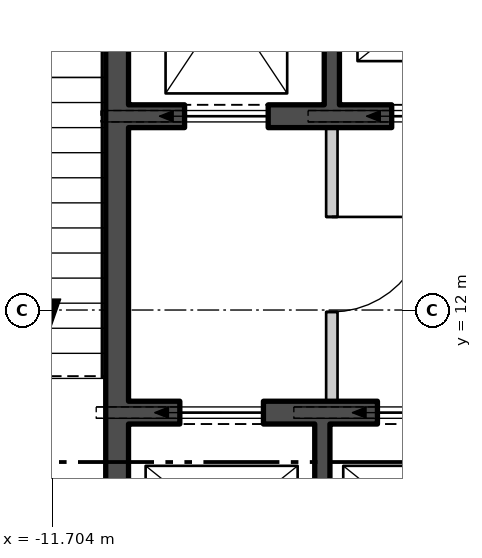
"""IFC4 building model, lengths in metres.
Left out: names, types, materials, properties, quantities, classifications, styles, units other than length and angle.
Written with IfcOpenShell. Run it as: python <this file> out.ifc"""

import sys

from ifc_helpers import new_model, si_unit, direction, frame, frame_2d, origin, place, context, subcontext, project, spatial, polyline, rectangle, outline, extrude, element, fill, save


model = new_model("IFC4")
c1 = context("Model", 3, precision=1e-05, world=origin(), true_north=direction((0.0, 1.0)))
c2 = subcontext(c1, "Body", "Model", "MODEL_VIEW")
j1 = project(units=[si_unit("LENGTHUNIT", "METRE"), si_unit("PLANEANGLEUNIT", "RADIAN")], contexts=[c1])
p1 = place(None, origin())
s1 = spatial("IfcSite", under=j1, at=p1, CompositionType="ELEMENT")
p2 = place(p1, origin())
s2 = spatial("IfcBuilding", under=s1, at=p2, CompositionType="ELEMENT")
p3 = place(p2, frame((0.0, 0.0, 139.8)))
s3 = spatial("IfcBuildingStorey", under=s2, at=p3, CompositionType="ELEMENT", Elevation=139.8)
p4 = place(p3, frame((-27.235, 12.423, -0.18), z_axis=(0.0, 0.0, 1.0), x_axis=(0.500000335318, -0.866025210188, 0.0)))
e1 = element("IfcWall", 1, at=p4, inside=s3, PredefinedType="SOLIDWALL", context=c2, shape_type="SweptSolid", body=[
    extrude(outline(polyline([(-0.13, -0.225), (45.88, -0.225), (45.62, 0.225), (0.13, 0.225), (-0.13, -0.225)])), origin(), (0.0, 0.0, 1.0), 3.68),
])
p5 = place(p4, frame((1.425, 0.0, 1.08)))
e2 = element("IfcOpeningElement", 2, at=p5, cuts=e1, PredefinedType="OPENING", context=c2, shape_type="SweptSolid", body=[
    extrude(rectangle(XDim=2.4, YDim=2.0, at=frame_2d((1.2, 1.0))), frame((0.0, 0.235, 0.0), z_axis=(0.0, -1.0, 0.0), x_axis=(1.0, 0.0, 0.0)), (0.0, 0.0, 1.0), 0.47),
])
p6 = place(p4, frame((5.895, 0.0, 1.08)))
e3 = element("IfcOpeningElement", 3, at=p6, cuts=e1, PredefinedType="OPENING", context=c2, shape_type="SweptSolid", body=[
    extrude(rectangle(XDim=2.4, YDim=2.0, at=frame_2d((1.2, 1.0))), frame((0.0, 0.235, 0.0), z_axis=(0.0, -1.0, 0.0), x_axis=(1.0, 0.0, 0.0)), (0.0, 0.0, 1.0), 0.47),
])
p7 = place(p4, frame((10.403, 0.0, 1.08)))
e4 = element("IfcOpeningElement", 4, at=p7, cuts=e1, PredefinedType="OPENING", context=c2, shape_type="SweptSolid", body=[
    extrude(rectangle(XDim=2.4, YDim=2.0, at=frame_2d((1.2, 1.0))), frame((0.0, 0.235, 0.0), z_axis=(0.0, -1.0, 0.0), x_axis=(1.0, 0.0, 0.0)), (0.0, 0.0, 1.0), 0.47),
])
p8 = place(p4, frame((14.912, 0.0, 1.08)))
e5 = element("IfcOpeningElement", 5, at=p8, cuts=e1, PredefinedType="OPENING", context=c2, shape_type="SweptSolid", body=[
    extrude(rectangle(XDim=2.4, YDim=2.0, at=frame_2d((1.2, 1.0))), frame((0.0, 0.235, 0.0), z_axis=(0.0, -1.0, 0.0), x_axis=(1.0, 0.0, 0.0)), (0.0, 0.0, 1.0), 0.47),
])
p9 = place(p4, frame((19.421, 0.0, 1.08)))
e6 = element("IfcOpeningElement", 6, at=p9, cuts=e1, PredefinedType="OPENING", context=c2, shape_type="SweptSolid", body=[
    extrude(rectangle(XDim=2.4, YDim=2.0, at=frame_2d((1.2, 1.0))), frame((0.0, 0.235, 0.0), z_axis=(0.0, -1.0, 0.0), x_axis=(1.0, 0.0, 0.0)), (0.0, 0.0, 1.0), 0.47),
])
p10 = place(p4, frame((23.929, 0.0, 1.08)))
e7 = element("IfcOpeningElement", 7, at=p10, cuts=e1, PredefinedType="OPENING", context=c2, shape_type="SweptSolid", body=[
    extrude(rectangle(XDim=2.4, YDim=2.0, at=frame_2d((1.2, 1.0))), frame((0.0, 0.235, 0.0), z_axis=(0.0, -1.0, 0.0), x_axis=(1.0, 0.0, 0.0)), (0.0, 0.0, 1.0), 0.47),
])
p11 = place(p4, frame((28.438, 0.0, 1.08)))
e8 = element("IfcOpeningElement", 8, at=p11, cuts=e1, PredefinedType="OPENING", context=c2, shape_type="SweptSolid", body=[
    extrude(rectangle(XDim=2.4, YDim=2.0, at=frame_2d((1.2, 1.0))), frame((0.0, 0.235, 0.0), z_axis=(0.0, -1.0, 0.0), x_axis=(1.0, 0.0, 0.0)), (0.0, 0.0, 1.0), 0.47),
])
p12 = place(p4, frame((32.947, 0.0, 1.08)))
e9 = element("IfcOpeningElement", 9, at=p12, cuts=e1, PredefinedType="OPENING", context=c2, shape_type="SweptSolid", body=[
    extrude(rectangle(XDim=2.4, YDim=2.0, at=frame_2d((1.2, 1.0))), frame((0.0, 0.235, 0.0), z_axis=(0.0, -1.0, 0.0), x_axis=(1.0, 0.0, 0.0)), (0.0, 0.0, 1.0), 0.47),
])
p13 = place(p4, frame((37.455, 0.0, 1.08)))
e10 = element("IfcOpeningElement", 10, at=p13, cuts=e1, PredefinedType="OPENING", context=c2, shape_type="SweptSolid", body=[
    extrude(rectangle(XDim=2.4, YDim=2.0, at=frame_2d((1.2, 1.0))), frame((0.0, 0.235, 0.0), z_axis=(0.0, -1.0, 0.0), x_axis=(1.0, 0.0, 0.0)), (0.0, 0.0, 1.0), 0.47),
])
p14 = place(p4, frame((41.925, 0.0, 1.08)))
e11 = element("IfcOpeningElement", 11, at=p14, cuts=e1, PredefinedType="OPENING", context=c2, shape_type="SweptSolid", body=[
    extrude(rectangle(XDim=2.4, YDim=2.0, at=frame_2d((1.2, 1.0))), frame((0.0, 0.235, 0.0), z_axis=(0.0, -1.0, 0.0), x_axis=(1.0, 0.0, 0.0)), (0.0, 0.0, 1.0), 0.47),
])
p15 = place(p3, frame((-10.85, 2.5, 0.0), z_axis=(0.0, 0.0, 1.0), x_axis=(0.0, 1.0, 0.0)))
e12 = element("IfcWall", 12, at=p15, inside=s3, PredefinedType="SHEAR", context=c2, shape_type="SweptSolid", body=[
    extrude(rectangle(XDim=15.0, YDim=0.3, at=frame_2d((7.5, 0.0))), origin(), (0.0, 0.0, 1.0), 3.7),
])
p16 = place(p15, frame((3.475, 0.0, 0.0)))
e13 = element("IfcOpeningElement", 13, at=p16, cuts=e12, PredefinedType="OPENING", context=c2, shape_type="SweptSolid", body=[
    extrude(rectangle(XDim=1.25, YDim=2.1, at=frame_2d((0.625, 1.05))), frame((0.0, 0.16, 0.0), z_axis=(0.0, -1.0, 0.0), x_axis=(1.0, 0.0, 0.0)), (0.0, 0.0, 1.0), 0.32),
])
p17 = place(p15, frame((1.125, 0.0, 0.0)))
e14 = element("IfcOpeningElement", 14, at=p17, cuts=e12, PredefinedType="OPENING", context=c2, shape_type="SweptSolid", body=[
    extrude(rectangle(XDim=1.0, YDim=2.1, at=frame_2d((0.5, 1.05))), frame((0.0, 0.16, 0.0), z_axis=(0.0, -1.0, 0.0), x_axis=(1.0, 0.0, 0.0)), (0.0, 0.0, 1.0), 0.32),
])
p18 = place(p3, frame((-10.7, 14.55, 0.0), z_axis=(0.0, 0.0, 1.0), x_axis=(1.0, 0.0, 0.0)))
e15 = element("IfcWall", 15, at=p18, inside=s3, PredefinedType="SHEAR", context=c2, shape_type="SweptSolid", body=[
    extrude(rectangle(XDim=21.4, YDim=0.3, at=frame_2d((10.7, 0.0))), origin(), (0.0, 0.0, 1.0), 3.7),
])
p19 = place(p18, frame((0.738, 0.0, 0.0)))
e16 = element("IfcOpeningElement", 16, at=p19, cuts=e15, PredefinedType="OPENING", context=c2, shape_type="SweptSolid", body=[
    extrude(rectangle(XDim=1.1, YDim=2.1, at=frame_2d((0.55, 1.05))), frame((0.0, 0.16, 0.0), z_axis=(0.0, -1.0, 0.0), x_axis=(1.0, 0.0, 0.0)), (0.0, 0.0, 1.0), 0.32),
])
p20 = place(p18, frame((3.462, 0.0, 0.0)))
e17 = element("IfcOpeningElement", 17, at=p20, cuts=e15, PredefinedType="OPENING", context=c2, shape_type="SweptSolid", body=[
    extrude(rectangle(XDim=1.1, YDim=2.1, at=frame_2d((0.55, 1.05))), frame((0.0, 0.16, 0.0), z_axis=(0.0, -1.0, 0.0), x_axis=(1.0, 0.0, 0.0)), (0.0, 0.0, 1.0), 0.32),
])
p21 = place(p18, frame((6.138, 0.0, 0.0)))
e18 = element("IfcOpeningElement", 18, at=p21, cuts=e15, PredefinedType="OPENING", context=c2, shape_type="SweptSolid", body=[
    extrude(rectangle(XDim=1.1, YDim=2.1, at=frame_2d((0.55, 1.05))), frame((0.0, 0.16, 0.0), z_axis=(0.0, -1.0, 0.0), x_axis=(1.0, 0.0, 0.0)), (0.0, 0.0, 1.0), 0.32),
])
p22 = place(p18, frame((8.812, 0.0, 0.0)))
e19 = element("IfcOpeningElement", 19, at=p22, cuts=e15, PredefinedType="OPENING", context=c2, shape_type="SweptSolid", body=[
    extrude(rectangle(XDim=1.1, YDim=2.1, at=frame_2d((0.55, 1.05))), frame((0.0, 0.16, 0.0), z_axis=(0.0, -1.0, 0.0), x_axis=(1.0, 0.0, 0.0)), (0.0, 0.0, 1.0), 0.32),
])
p23 = place(p18, frame((19.562, 0.0, 0.0)))
e20 = element("IfcOpeningElement", 20, at=p23, cuts=e15, PredefinedType="OPENING", context=c2, shape_type="SweptSolid", body=[
    extrude(rectangle(XDim=1.1, YDim=2.1, at=frame_2d((0.55, 1.05))), frame((0.0, 0.16, 0.0), z_axis=(0.0, -1.0, 0.0), x_axis=(1.0, 0.0, 0.0)), (0.0, 0.0, 1.0), 0.32),
])
p24 = place(p18, frame((11.537, 0.0, 0.0)))
e21 = element("IfcOpeningElement", 21, at=p24, cuts=e15, PredefinedType="OPENING", context=c2, shape_type="SweptSolid", body=[
    extrude(rectangle(XDim=1.0, YDim=2.1, at=frame_2d((0.5, 1.05))), frame((0.0, 0.16, 0.0), z_axis=(0.0, -1.0, 0.0), x_axis=(1.0, 0.0, 0.0)), (0.0, 0.0, 1.0), 0.32),
])
p25 = place(p18, frame((14.213, 0.0, 0.0)))
e22 = element("IfcOpeningElement", 22, at=p25, cuts=e15, PredefinedType="OPENING", context=c2, shape_type="SweptSolid", body=[
    extrude(rectangle(XDim=1.0, YDim=2.1, at=frame_2d((0.5, 1.05))), frame((0.0, 0.16, 0.0), z_axis=(0.0, -1.0, 0.0), x_axis=(1.0, 0.0, 0.0)), (0.0, 0.0, 1.0), 0.32),
])
p26 = place(p18, frame((16.887, 0.0, 0.0)))
e23 = element("IfcOpeningElement", 23, at=p26, cuts=e15, PredefinedType="OPENING", context=c2, shape_type="SweptSolid", body=[
    extrude(rectangle(XDim=1.0, YDim=2.1, at=frame_2d((0.5, 1.05))), frame((0.0, 0.16, 0.0), z_axis=(0.0, -1.0, 0.0), x_axis=(1.0, 0.0, 0.0)), (0.0, 0.0, 1.0), 0.32),
])
p27 = place(p3, frame((-10.7, 10.65, 0.0), z_axis=(0.0, 0.0, 1.0), x_axis=(1.0, 0.0, 0.0)))
e24 = element("IfcWall", 24, at=p27, inside=s3, PredefinedType="SHEAR", context=c2, shape_type="SweptSolid", body=[
    extrude(rectangle(XDim=10.3, YDim=0.3, at=frame_2d((5.15, 0.0))), origin(), (0.0, 0.0, 1.0), 3.7),
])
p28 = place(p27, frame((0.675, 0.0, 0.0)))
e25 = element("IfcOpeningElement", 25, at=p28, cuts=e24, PredefinedType="OPENING", context=c2, shape_type="SweptSolid", body=[
    extrude(rectangle(XDim=1.1, YDim=2.1, at=frame_2d((0.55, 1.05))), frame((0.0, 0.16, 0.0), z_axis=(0.0, -1.0, 0.0), x_axis=(1.0, 0.0, 0.0)), (0.0, 0.0, 1.0), 0.32),
])
p29 = place(p27, frame((3.275, 0.0, 0.0)))
e26 = element("IfcOpeningElement", 26, at=p29, cuts=e24, PredefinedType="OPENING", context=c2, shape_type="SweptSolid", body=[
    extrude(rectangle(XDim=1.1, YDim=2.1, at=frame_2d((0.55, 1.05))), frame((0.0, 0.16, 0.0), z_axis=(0.0, -1.0, 0.0), x_axis=(1.0, 0.0, 0.0)), (0.0, 0.0, 1.0), 0.32),
])
p30 = place(p27, frame((5.825, 0.0, 0.0)))
e27 = element("IfcOpeningElement", 27, at=p30, cuts=e24, PredefinedType="OPENING", context=c2, shape_type="SweptSolid", body=[
    extrude(rectangle(XDim=1.1, YDim=2.1, at=frame_2d((0.55, 1.05))), frame((0.0, 0.16, 0.0), z_axis=(0.0, -1.0, 0.0), x_axis=(1.0, 0.0, 0.0)), (0.0, 0.0, 1.0), 0.32),
])
p31 = place(p27, frame((8.425, 0.0, 0.0)))
e28 = element("IfcOpeningElement", 28, at=p31, cuts=e24, PredefinedType="OPENING", context=c2, shape_type="SweptSolid", body=[
    extrude(rectangle(XDim=1.0, YDim=2.1, at=frame_2d((0.5, 1.05))), frame((0.0, 0.16, 0.0), z_axis=(0.0, -1.0, 0.0), x_axis=(1.0, 0.0, 0.0)), (0.0, 0.0, 1.0), 0.32),
])
p32 = place(p3, frame((-8.025, 14.7, 0.0), z_axis=(0.0, 0.0, 1.0), x_axis=(0.0, 1.0, 0.0)))
e29 = element("IfcWall", 29, at=p32, inside=s3, PredefinedType="SHEAR", context=c2, shape_type="SweptSolid", body=[
    extrude(rectangle(XDim=2.8, YDim=0.2, at=frame_2d((1.4, 0.0))), origin(), (0.0, 0.0, 1.0), 3.7),
])
p33 = place(p3, frame((-8.15, 7.8, 0.0), z_axis=(0.0, 0.0, 1.0), x_axis=(0.0, 1.0, 0.0)))
e30 = element("IfcWall", 30, at=p33, inside=s3, PredefinedType="SHEAR", context=c2, shape_type="SweptSolid", body=[
    extrude(rectangle(XDim=2.7, YDim=0.2, at=frame_2d((1.35, 0.0))), origin(), (0.0, 0.0, 1.0), 3.7),
])
p34 = place(p3, frame((-8.025, 10.8, 0.0), z_axis=(0.0, 0.0, 1.0), x_axis=(0.0, 1.0, 0.0)))
e31 = element("IfcWall", 31, at=p34, inside=s3, PredefinedType="PARTITIONING", context=c2, shape_type="SweptSolid", body=[
    extrude(rectangle(XDim=3.6, YDim=0.15, at=frame_2d((1.8, 0.0))), origin(), (0.0, 0.0, 1.0), 3.7),
])
p35 = place(p34, frame((1.175, 0.0, 0.0)))
e32 = element("IfcOpeningElement", 32, at=p35, cuts=e31, PredefinedType="OPENING", context=c2, shape_type="SweptSolid", body=[
    extrude(rectangle(XDim=1.25, YDim=2.1, at=frame_2d((0.625, 1.05))), frame((0.0, 0.085, 0.0), z_axis=(0.0, -1.0, 0.0), x_axis=(1.0, 0.0, 0.0)), (0.0, 0.0, 1.0), 0.17),
])
p36 = place(p19, origin())
e33 = element("IfcDoor", 33, at=p36, inside=s3, OperationType="SLIDING_TO_LEFT", PredefinedType="DOOR", context=c2, shape_type="SweptSolid", body=[
    extrude(rectangle(XDim=1.1, YDim=2.1, at=frame_2d((0.55, 1.05))), frame((0.0, 0.025, 0.0), z_axis=(0.0, -1.0, 0.0), x_axis=(1.0, 0.0, 0.0)), (0.0, 0.0, 1.0), 0.05),
])
fill(e16, e33)
p37 = place(p20, origin())
e34 = element("IfcDoor", 34, at=p37, inside=s3, OperationType="SLIDING_TO_LEFT", PredefinedType="DOOR", context=c2, shape_type="SweptSolid", body=[
    extrude(rectangle(XDim=1.1, YDim=2.1, at=frame_2d((0.55, 1.05))), frame((0.0, 0.025, 0.0), z_axis=(0.0, -1.0, 0.0), x_axis=(1.0, 0.0, 0.0)), (0.0, 0.0, 1.0), 0.05),
])
fill(e17, e34)
p38 = place(p28, origin())
e35 = element("IfcDoor", 35, at=p38, inside=s3, OperationType="SLIDING_TO_LEFT", PredefinedType="DOOR", context=c2, shape_type="SweptSolid", body=[
    extrude(rectangle(XDim=1.1, YDim=2.1, at=frame_2d((0.55, 1.05))), frame((0.0, 0.025, 0.0), z_axis=(0.0, -1.0, 0.0), x_axis=(1.0, 0.0, 0.0)), (0.0, 0.0, 1.0), 0.05),
])
fill(e25, e35)
p39 = place(p29, origin())
e36 = element("IfcDoor", 36, at=p39, inside=s3, OperationType="SLIDING_TO_LEFT", PredefinedType="DOOR", context=c2, shape_type="SweptSolid", body=[
    extrude(rectangle(XDim=1.1, YDim=2.1, at=frame_2d((0.55, 1.05))), frame((0.0, 0.025, 0.0), z_axis=(0.0, -1.0, 0.0), x_axis=(1.0, 0.0, 0.0)), (0.0, 0.0, 1.0), 0.05),
])
fill(e26, e36)
p40 = place(p35, origin())
e37 = element("IfcDoor", 37, at=p40, inside=s3, OperationType="SINGLE_SWING_RIGHT", PredefinedType="DOOR", context=c2, shape_type="SweptSolid", body=[
    extrude(rectangle(XDim=1.25, YDim=2.1, at=frame_2d((0.625, 1.05))), frame((0.0, 0.025, 0.0), z_axis=(0.0, -1.0, 0.0), x_axis=(1.0, 0.0, 0.0)), (0.0, 0.0, 1.0), 0.05),
])
fill(e32, e37)
save(model, sys.argv[1])
